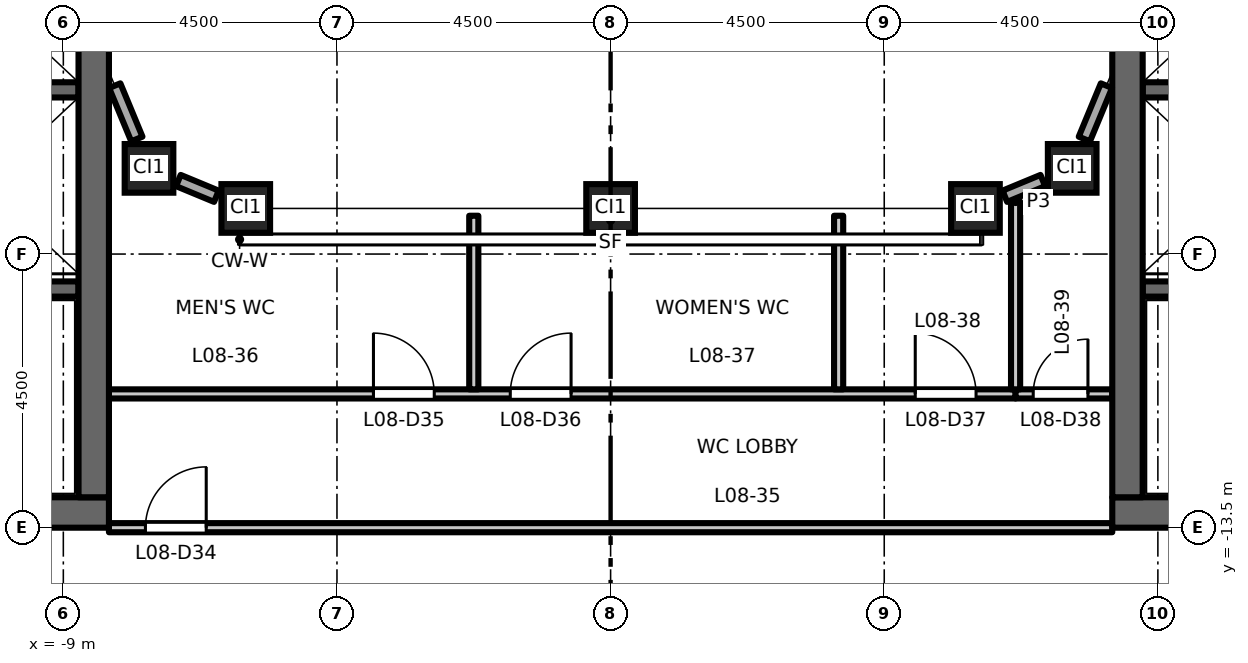
"""IFC4 building model, lengths in metres.
Left out: names, types, materials, properties, quantities, classifications, styles, units other than length and angle.
Written with IfcOpenShell. Run it as: python <this file> out.ifc"""

import sys

from ifc_helpers import new_model, si_unit, direction, frame, frame_2d, origin, origin_2d, place, context, subcontext, project, spatial, rectangle, hollow_rectangle, extrude, element, fill, save


model = new_model("IFC4")
c1 = context("Model", 3, precision=1e-05, world=origin(), true_north=direction((0.0, 1.0)))
c2 = subcontext(c1, "Body", "Model", "MODEL_VIEW")
j1 = project(units=[si_unit("LENGTHUNIT", "METRE"), si_unit("PLANEANGLEUNIT", "RADIAN")], contexts=[c1])
p1 = place(None, origin())
s1 = spatial("IfcSite", under=j1, at=p1, CompositionType="ELEMENT")
p2 = place(p1, origin())
s2 = spatial("IfcBuilding", under=s1, at=p2, CompositionType="ELEMENT")
p3 = place(p2, frame((0.0, 0.0, 40.2)))
s3 = spatial("IfcBuildingStorey", under=s2, at=p3, CompositionType="ELEMENT", Elevation=40.2)
for number, where, z_axis, x_axis in (
    (1, (-7.591, -7.591, 0.0), (0.0, 0.0, 1.0), (1.0, 0.0, 0.0)),
    (2, (-6.0, -8.25, 0.0), (0.0, 0.0, 1.0), (1.0, 0.0, 0.0)),
    (3, (0.0, -8.25, 0.0), (0.0, 0.0, 1.0), (1.0, 0.0, 0.0)),
    (4, (6.0, -8.25, 0.0), (0.0, 0.0, 1.0), (1.0, 0.0, 0.0)),
    (5, (7.591, -7.591, 0.0), (0.0, 0.0, 1.0), (1.0, 0.0, 0.0)),
):
    element("IfcColumn", number, at=place(p3, frame(where, z_axis=z_axis, x_axis=x_axis)), inside=s3, PredefinedType="COLUMN", context=c2, shape_type="SweptSolid", body=[
        extrude(hollow_rectangle(XDim=0.8, YDim=0.8, WallThickness=0.05, at=origin_2d()), origin(), (0.0, 0.0, 1.0), 4.5),
    ])
p4 = place(p3, frame((-8.75, -6.3, 0.0), z_axis=(0.0, 0.0, 1.0), x_axis=(-1.0, 0.0, 0.0)))
e6 = element("IfcWall", 6, at=p4, inside=s3, PredefinedType="SHEAR", context=c2, shape_type="SweptSolid", body=[
    extrude(rectangle(XDim=3.1, YDim=0.25, at=frame_2d((1.55, 0.0))), origin(), (0.0, 0.0, 1.0), 4.35),
])
p5 = place(p3, frame((-8.75, -9.575, 0.0), z_axis=(0.0, 0.0, 1.0), x_axis=(-1.0, 0.0, 0.0)))
e7 = element("IfcWall", 7, at=p5, inside=s3, PredefinedType="SHEAR", context=c2, shape_type="SweptSolid", body=[
    extrude(rectangle(XDim=8.0, YDim=0.25, at=frame_2d((4.0, 0.0))), origin(), (0.0, 0.0, 1.0), 4.35),
])
p6 = place(p5, frame((6.65, 0.0, 0.0)))
e8 = element("IfcOpeningElement", 8, at=p6, cuts=e7, PredefinedType="OPENING", context=c2, shape_type="SweptSolid", body=[
    extrude(rectangle(XDim=1.1, YDim=2.1, at=frame_2d((0.55, 1.05))), frame((0.0, 0.135, 0.0), z_axis=(0.0, -1.0, 0.0), x_axis=(1.0, 0.0, 0.0)), (0.0, 0.0, 1.0), 0.27),
])
p7 = place(p3, frame((-8.25, -13.25, 0.0), z_axis=(0.0, 0.0, 1.0), x_axis=(-1.0, 0.0, 0.0)))
e9 = element("IfcWall", 9, at=p7, inside=s3, PredefinedType="SHEAR", context=c2, shape_type="SweptSolid", body=[
    extrude(rectangle(XDim=13.5, YDim=0.5, at=frame_2d((6.75, 0.0))), origin(), (0.0, 0.0, 1.0), 4.35),
])
p8 = place(p3, frame((-8.5, -13.0, 0.0), z_axis=(0.0, 0.0, 1.0), x_axis=(0.0, 1.0, 0.0)))
e10 = element("IfcWall", 10, at=p8, inside=s3, PredefinedType="SHEAR", context=c2, shape_type="SweptSolid", body=[
    extrude(rectangle(XDim=26.0, YDim=0.5, at=frame_2d((13.0, 0.0))), origin(), (0.0, 0.0, 1.0), 4.35),
])
p9 = place(p3, frame((8.75, -6.3, 0.0), z_axis=(0.0, 0.0, 1.0), x_axis=(1.0, 0.0, 0.0)))
e11 = element("IfcWall", 11, at=p9, inside=s3, PredefinedType="SHEAR", context=c2, shape_type="SweptSolid", body=[
    extrude(rectangle(XDim=3.1, YDim=0.25, at=frame_2d((1.55, 0.0))), origin(), (0.0, 0.0, 1.0), 4.35),
])
p10 = place(p3, frame((8.75, -9.575, 0.0), z_axis=(0.0, 0.0, 1.0), x_axis=(1.0, 0.0, 0.0)))
e12 = element("IfcWall", 12, at=p10, inside=s3, PredefinedType="SHEAR", context=c2, shape_type="SweptSolid", body=[
    extrude(rectangle(XDim=8.0, YDim=0.25, at=frame_2d((4.0, 0.0))), origin(), (0.0, 0.0, 1.0), 4.35),
])
p11 = place(p10, frame((6.65, 0.0, 0.0)))
e13 = element("IfcOpeningElement", 13, at=p11, cuts=e12, PredefinedType="OPENING", context=c2, shape_type="SweptSolid", body=[
    extrude(rectangle(XDim=1.1, YDim=2.1, at=frame_2d((0.55, 1.05))), frame((0.0, 0.135, 0.0), z_axis=(0.0, -1.0, 0.0), x_axis=(1.0, 0.0, 0.0)), (0.0, 0.0, 1.0), 0.27),
])
p12 = place(p3, frame((8.25, -13.25, 0.0), z_axis=(0.0, 0.0, 1.0), x_axis=(1.0, 0.0, 0.0)))
e14 = element("IfcWall", 14, at=p12, inside=s3, PredefinedType="SHEAR", context=c2, shape_type="SweptSolid", body=[
    extrude(rectangle(XDim=13.5, YDim=0.5, at=frame_2d((6.75, 0.0))), origin(), (0.0, 0.0, 1.0), 4.35),
])
p13 = place(p3, frame((8.5, -13.0, 0.0), z_axis=(0.0, 0.0, 1.0), x_axis=(0.0, 1.0, 0.0)))
e15 = element("IfcWall", 15, at=p13, inside=s3, PredefinedType="SHEAR", context=c2, shape_type="SweptSolid", body=[
    extrude(rectangle(XDim=26.0, YDim=0.5, at=frame_2d((13.0, 0.0))), origin(), (0.0, 0.0, 1.0), 4.35),
])
p14 = place(p3, frame((6.483, -8.05, 0.0), z_axis=(0.0, 0.0, 1.0), x_axis=(0.923854141361, 0.382744726273, 0.0)))
e16 = element("IfcWall", 16, at=p14, inside=s3, PredefinedType="STANDARD", context=c2, shape_type="SweptSolid", body=[
    extrude(rectangle(XDim=0.677, YDim=0.2, at=frame_2d((0.338, 0.0))), origin(), (0.0, 0.0, 1.0), 3.73),
])
for number, where, z_axis, x_axis in (
    (17, (7.791, -7.108, 0.0), (0.0, 0.0, 1.0), (0.383, 0.924, 0.0)),
    (18, (-8.154, -6.231, 0.0), (0.0, 0.0, 1.0), (0.383, -0.924, 0.0)),
):
    element("IfcWall", number, at=place(p3, frame(where, z_axis=z_axis, x_axis=x_axis)), inside=s3, PredefinedType="STANDARD", context=c2, shape_type="SweptSolid", body=[
        extrude(rectangle(XDim=0.949, YDim=0.2, at=frame_2d((0.475, 0.0))), origin(), (0.0, 0.0, 1.0), 3.73),
    ])
p15 = place(p3, frame((-7.108, -7.791, 0.0), z_axis=(0.0, 0.0, 1.0), x_axis=(0.923854141361, -0.382744726273, 0.0)))
e19 = element("IfcWall", 19, at=p15, inside=s3, PredefinedType="STANDARD", context=c2, shape_type="SweptSolid", body=[
    extrude(rectangle(XDim=0.677, YDim=0.2, at=frame_2d((0.338, 0.0))), origin(), (0.0, 0.0, 1.0), 3.73),
])
p16 = place(p3, frame((-8.25, -13.5, 0.0), z_axis=(0.0, 0.0, 1.0), x_axis=(1.0, 0.0, 0.0)))
e20 = element("IfcWall", 20, at=p16, inside=s3, PredefinedType="PARTITIONING", context=c2, shape_type="SweptSolid", body=[
    extrude(rectangle(XDim=16.5, YDim=0.15, at=frame_2d((8.25, 0.0))), origin(), (0.0, 0.0, 1.0), 3.85),
])
p17 = place(p16, frame((0.6, 0.0, 0.0)))
e21 = element("IfcOpeningElement", 21, at=p17, cuts=e20, PredefinedType="OPENING", context=c2, shape_type="SweptSolid", body=[
    extrude(rectangle(XDim=1.0, YDim=2.1, at=frame_2d((0.5, 1.05))), frame((0.0, 0.085, 0.0), z_axis=(0.0, -1.0, 0.0), x_axis=(1.0, 0.0, 0.0)), (0.0, 0.0, 1.0), 0.17),
])
p18 = place(p3, frame((-8.25, -11.3, 0.0), z_axis=(0.0, 0.0, 1.0), x_axis=(1.0, 0.0, 0.0)))
e22 = element("IfcWall", 22, at=p18, inside=s3, PredefinedType="PARTITIONING", context=c2, shape_type="SweptSolid", body=[
    extrude(rectangle(XDim=14.91, YDim=0.15, at=frame_2d((7.455, 0.0))), origin(), (0.0, 0.0, 1.0), 4.35),
])
p19 = place(p18, frame((4.35, 0.0, 0.0)))
e23 = element("IfcOpeningElement", 23, at=p19, cuts=e22, PredefinedType="OPENING", context=c2, shape_type="SweptSolid", body=[
    extrude(rectangle(XDim=1.0, YDim=2.1, at=frame_2d((0.5, 1.05))), frame((0.0, 0.085, 0.0), z_axis=(0.0, -1.0, 0.0), x_axis=(1.0, 0.0, 0.0)), (0.0, 0.0, 1.0), 0.17),
])
p20 = place(p18, frame((6.6, 0.0, 0.0)))
e24 = element("IfcOpeningElement", 24, at=p20, cuts=e22, PredefinedType="OPENING", context=c2, shape_type="SweptSolid", body=[
    extrude(rectangle(XDim=1.0, YDim=2.1, at=frame_2d((0.5, 1.05))), frame((0.0, 0.085, 0.0), z_axis=(0.0, -1.0, 0.0), x_axis=(1.0, 0.0, 0.0)), (0.0, 0.0, 1.0), 0.17),
])
p21 = place(p18, frame((13.26, 0.0, 0.0)))
e25 = element("IfcOpeningElement", 25, at=p21, cuts=e22, PredefinedType="OPENING", context=c2, shape_type="SweptSolid", body=[
    extrude(rectangle(XDim=1.0, YDim=2.1, at=frame_2d((0.5, 1.05))), frame((0.0, 0.085, 0.0), z_axis=(0.0, -1.0, 0.0), x_axis=(1.0, 0.0, 0.0)), (0.0, 0.0, 1.0), 0.17),
])
p22 = place(p3, frame((6.66, -11.3, 0.0), z_axis=(0.0, 0.0, 1.0), x_axis=(1.0, 0.0, 0.0)))
e26 = element("IfcWall", 26, at=p22, inside=s3, PredefinedType="PARTITIONING", context=c2, shape_type="SweptSolid", body=[
    extrude(rectangle(XDim=1.59, YDim=0.15, at=frame_2d((0.795, 0.0))), origin(), (0.0, 0.0, 1.0), 4.35),
])
p23 = place(p22, frame((0.29, 0.0, 0.0)))
e27 = element("IfcOpeningElement", 27, at=p23, cuts=e26, PredefinedType="OPENING", context=c2, shape_type="SweptSolid", body=[
    extrude(rectangle(XDim=0.9, YDim=2.1, at=frame_2d((0.45, 1.05))), frame((0.0, 0.085, 0.0), z_axis=(0.0, -1.0, 0.0), x_axis=(1.0, 0.0, 0.0)), (0.0, 0.0, 1.0), 0.17),
])
for number, where, z_axis, x_axis in (
    (28, (-2.25, -11.225, 0.0), (0.0, 0.0, 1.0), (0.0, 1.0, 0.0)),
    (29, (3.75, -11.225, 0.0), (0.0, 0.0, 1.0), (0.0, 1.0, 0.0)),
):
    element("IfcWall", number, at=place(p3, frame(where, z_axis=z_axis, x_axis=x_axis)), inside=s3, PredefinedType="PARTITIONING", context=c2, shape_type="SweptSolid", body=[
        extrude(rectangle(XDim=2.855, YDim=0.15, at=frame_2d((1.427, 0.0))), origin(), (0.0, 0.0, 1.0), 4.35),
    ])
p24 = place(p3, frame((6.66, -11.225, 0.0), z_axis=(0.0, 0.0, 1.0), x_axis=(0.0, 1.0, 0.0)))
e30 = element("IfcWall", 30, at=p24, inside=s3, PredefinedType="PARTITIONING", context=c2, shape_type="SweptSolid", body=[
    extrude(rectangle(XDim=3.089, YDim=0.15, at=frame_2d((1.544, 0.0))), origin(), (0.0, 0.0, 1.0), 4.35),
])
p25 = place(p17, origin())
e31 = element("IfcDoor", 31, at=p25, inside=s3, OperationType="SINGLE_SWING_RIGHT", PredefinedType="DOOR", context=c2, shape_type="SweptSolid", body=[
    extrude(rectangle(XDim=1.0, YDim=2.1, at=frame_2d((0.5, 1.05))), frame((0.0, 0.025, 0.0), z_axis=(0.0, -1.0, 0.0), x_axis=(1.0, 0.0, 0.0)), (0.0, 0.0, 1.0), 0.05),
])
fill(e21, e31)
p26 = place(p19, origin())
e32 = element("IfcDoor", 32, at=p26, inside=s3, OperationType="SINGLE_SWING_LEFT", PredefinedType="DOOR", context=c2, shape_type="SweptSolid", body=[
    extrude(rectangle(XDim=1.0, YDim=2.1, at=frame_2d((0.5, 1.05))), frame((0.0, 0.025, 0.0), z_axis=(0.0, -1.0, 0.0), x_axis=(1.0, 0.0, 0.0)), (0.0, 0.0, 1.0), 0.05),
])
fill(e23, e32)
p27 = place(p20, origin())
e33 = element("IfcDoor", 33, at=p27, inside=s3, OperationType="SINGLE_SWING_RIGHT", PredefinedType="DOOR", context=c2, shape_type="SweptSolid", body=[
    extrude(rectangle(XDim=1.0, YDim=2.1, at=frame_2d((0.5, 1.05))), frame((0.0, 0.025, 0.0), z_axis=(0.0, -1.0, 0.0), x_axis=(1.0, 0.0, 0.0)), (0.0, 0.0, 1.0), 0.05),
])
fill(e24, e33)
p28 = place(p21, origin())
e34 = element("IfcDoor", 34, at=p28, inside=s3, OperationType="SINGLE_SWING_LEFT", PredefinedType="DOOR", context=c2, shape_type="SweptSolid", body=[
    extrude(rectangle(XDim=1.0, YDim=2.1, at=frame_2d((0.5, 1.05))), frame((0.0, 0.025, 0.0), z_axis=(0.0, -1.0, 0.0), x_axis=(1.0, 0.0, 0.0)), (0.0, 0.0, 1.0), 0.05),
])
fill(e25, e34)
p29 = place(p23, origin())
e35 = element("IfcDoor", 35, at=p29, inside=s3, OperationType="SINGLE_SWING_RIGHT", PredefinedType="DOOR", context=c2, shape_type="SweptSolid", body=[
    extrude(rectangle(XDim=0.9, YDim=2.1, at=frame_2d((0.45, 1.05))), frame((0.0, 0.025, 0.0), z_axis=(0.0, -1.0, 0.0), x_axis=(1.0, 0.0, 0.0)), (0.0, 0.0, 1.0), 0.05),
])
fill(e27, e35)
save(model, sys.argv[1])
